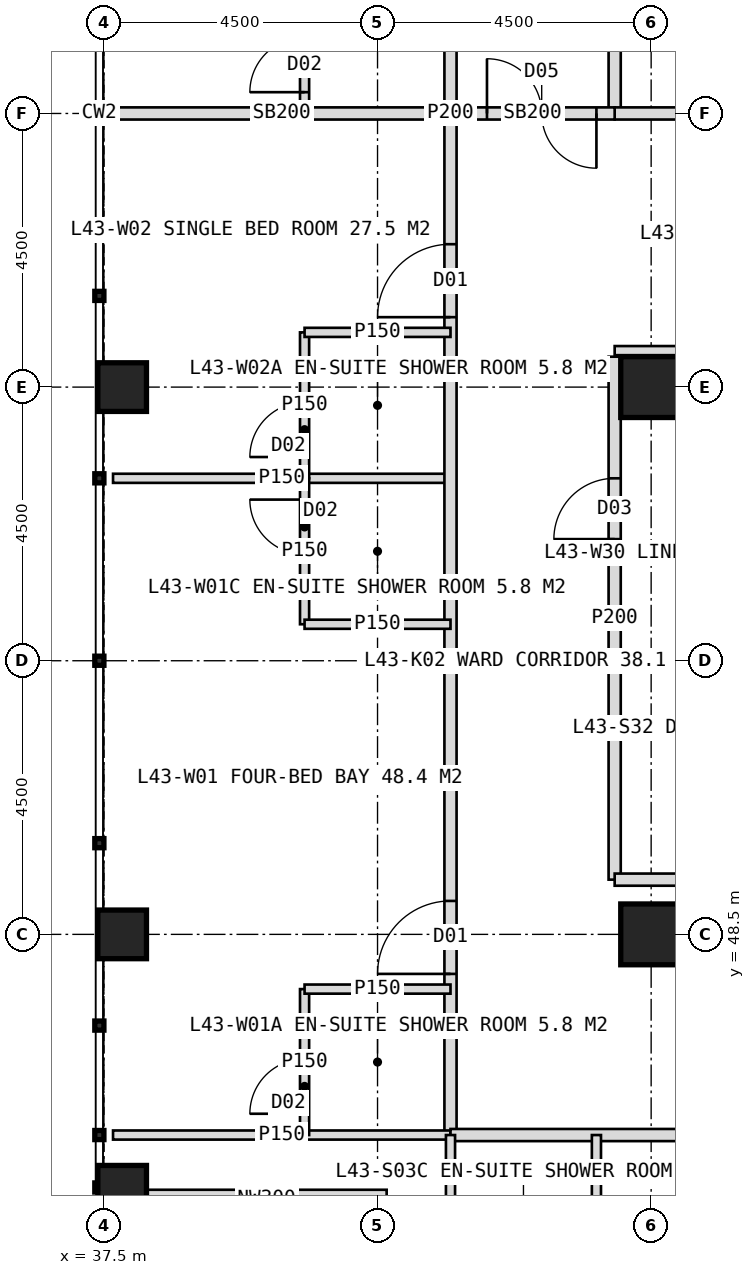
"""IFC4 building model, lengths in metres.
Left out: names, types, materials, properties, quantities, classifications, styles, units other than length and angle.
Written with IfcOpenShell. Run it as: python <this file> out.ifc"""

import sys

from ifc_helpers import new_model, si_unit, direction, frame, frame_2d, origin, origin_2d, place, context, subcontext, project, spatial, rectangle, hollow_rectangle, extrude, element, fill, save


model = new_model("IFC4")
c1 = context("Model", 3, precision=1e-05, world=origin(), true_north=direction((0.0, 1.0)))
c2 = subcontext(c1, "Body", "Model", "MODEL_VIEW")
j1 = project(units=[si_unit("LENGTHUNIT", "METRE"), si_unit("PLANEANGLEUNIT", "RADIAN")], contexts=[c1])
p1 = place(None, origin())
s1 = spatial("IfcSite", under=j1, at=p1, CompositionType="ELEMENT")
p2 = place(p1, origin())
s2 = spatial("IfcBuilding", under=s1, at=p2, CompositionType="ELEMENT")
p3 = place(p2, frame((0.0, 0.0, 181.0)))
s3 = spatial("IfcBuildingStorey", under=s2, at=p3, CompositionType="ELEMENT", Elevation=181.0)
for number, where, z_axis, x_axis in (
    (1, (46.5, 48.5, 0.0), (0.0, 0.0, 1.0), (1.0, 0.0, 0.0)),
    (2, (46.5, 57.5, 0.0), (0.0, 0.0, 1.0), (1.0, 0.0, 0.0)),
):
    element("IfcColumn", number, at=place(p3, frame(where, z_axis=z_axis, x_axis=x_axis)), inside=s3, PredefinedType="COLUMN", context=c2, shape_type="SweptSolid", body=[
        extrude(hollow_rectangle(XDim=1.0, YDim=1.0, WallThickness=0.1, at=origin_2d()), origin(), (0.0, 0.0, 1.0), 4.0),
    ])
for number, where, z_axis, x_axis in (
    (3, (37.8, 44.3, 0.0), (0.0, 0.0, 1.0), (1.0, 0.0, 0.0)),
    (4, (37.8, 48.5, 0.0), (0.0, 0.0, 1.0), (1.0, 0.0, 0.0)),
    (5, (37.8, 57.5, 0.0), (0.0, 0.0, 1.0), (1.0, 0.0, 0.0)),
):
    element("IfcColumn", number, at=place(p3, frame(where, z_axis=z_axis, x_axis=x_axis)), inside=s3, PredefinedType="COLUMN", context=c2, shape_type="SweptSolid", body=[
        extrude(hollow_rectangle(XDim=0.8, YDim=0.8, WallThickness=0.08, at=origin_2d()), origin(), (0.0, 0.0, 1.0), 4.0),
    ])
p4 = place(p3, frame((42.15, 44.15, 0.0), z_axis=(0.0, 0.0, 1.0), x_axis=(-1.0, 0.0, 0.0)))
e6 = element("IfcWall", 6, at=p4, inside=s3, PredefinedType="ELEMENTEDWALL", context=c2, shape_type="SweptSolid", body=[
    extrude(rectangle(XDim=3.95, YDim=0.3, at=frame_2d((1.975, 0.0))), origin(), (0.0, 0.0, 1.0), 2.85),
])
p5 = place(p3, frame((43.2, 56.0, 0.0), z_axis=(0.0, 0.0, 1.0), x_axis=(-1.0, 0.0, 0.0)))
e7 = element("IfcWall", 7, at=p5, inside=s3, PredefinedType="PARTITIONING", context=c2, shape_type="SweptSolid", body=[
    extrude(rectangle(XDim=5.55, YDim=0.15, at=frame_2d((2.775, 0.0))), origin(), (0.0, 0.0, 1.0), 3.75),
])
p6 = place(p3, frame((43.2, 62.0, 0.0), z_axis=(0.0, 0.0, 1.0), x_axis=(-1.0, 0.0, 0.0)))
e8 = element("IfcWall", 8, at=p6, inside=s3, PredefinedType="SOLIDWALL", context=c2, shape_type="SweptSolid", body=[
    extrude(rectangle(XDim=5.55, YDim=0.2, at=frame_2d((2.775, 0.0))), origin(), (0.0, 0.0, 1.0), 2.95),
])
p7 = place(p3, frame((43.2, 45.2, 0.0), z_axis=(0.0, 0.0, 1.0), x_axis=(0.0, 1.0, 0.0)))
e9 = element("IfcWall", 9, at=p7, inside=s3, PredefinedType="PARTITIONING", context=c2, shape_type="SweptSolid", body=[
    extrude(rectangle(XDim=33.6, YDim=0.2, at=frame_2d((16.8, 0.0))), origin(), (0.0, 0.0, 1.0), 3.75),
])
p8 = place(p7, frame((2.65, 0.0, 0.0)))
e10 = element("IfcOpeningElement", 10, at=p8, cuts=e9, PredefinedType="OPENING", context=c2, shape_type="SweptSolid", body=[
    extrude(rectangle(XDim=1.2, YDim=2.2, at=frame_2d((0.6, 1.1))), frame((0.0, 0.11, 0.0), z_axis=(0.0, -1.0, 0.0), x_axis=(1.0, 0.0, 0.0)), (0.0, 0.0, 1.0), 0.22),
])
p9 = place(p7, frame((13.45, 0.0, 0.0)))
e11 = element("IfcOpeningElement", 11, at=p9, cuts=e9, PredefinedType="OPENING", context=c2, shape_type="SweptSolid", body=[
    extrude(rectangle(XDim=1.2, YDim=2.2, at=frame_2d((0.6, 1.1))), frame((0.0, 0.11, 0.0), z_axis=(0.0, -1.0, 0.0), x_axis=(1.0, 0.0, 0.0)), (0.0, 0.0, 1.0), 0.22),
])
p10 = place(p7, frame((20.05, 0.0, 0.0)))
e12 = element("IfcOpeningElement", 12, at=p10, cuts=e9, PredefinedType="OPENING", context=c2, shape_type="SweptSolid", body=[
    extrude(rectangle(XDim=1.2, YDim=2.2, at=frame_2d((0.6, 1.1))), frame((0.0, 0.11, 0.0), z_axis=(0.0, -1.0, 0.0), x_axis=(1.0, 0.0, 0.0)), (0.0, 0.0, 1.0), 0.22),
])
p11 = place(p7, frame((29.05, 0.0, 0.0)))
e13 = element("IfcOpeningElement", 13, at=p11, cuts=e9, PredefinedType="OPENING", context=c2, shape_type="SweptSolid", body=[
    extrude(rectangle(XDim=1.2, YDim=2.2, at=frame_2d((0.6, 1.1))), frame((0.0, 0.11, 0.0), z_axis=(0.0, -1.0, 0.0), x_axis=(1.0, 0.0, 0.0)), (0.0, 0.0, 1.0), 0.22),
])
p12 = place(p3, frame((43.2, 45.2, 0.0), z_axis=(0.0, 0.0, 1.0), x_axis=(-1.0, 0.0, 0.0)))
e14 = element("IfcWall", 14, at=p12, inside=s3, PredefinedType="PARTITIONING", context=c2, shape_type="SweptSolid", body=[
    extrude(rectangle(XDim=5.55, YDim=0.15, at=frame_2d((2.775, 0.0))), origin(), (0.0, 0.0, 1.0), 3.75),
])
p13 = place(p3, frame((40.8, 45.2, 0.0), z_axis=(0.0, 0.0, 1.0), x_axis=(0.0, 1.0, 0.0)))
e15 = element("IfcWall", 15, at=p13, inside=s3, PredefinedType="PARTITIONING", context=c2, shape_type="SweptSolid", body=[
    extrude(rectangle(XDim=2.4, YDim=0.15, at=frame_2d((1.2, 0.0))), origin(), (0.0, 0.0, 1.0), 3.75),
])
p14 = place(p13, frame((0.35, 0.0, 0.0)))
e16 = element("IfcOpeningElement", 16, at=p14, cuts=e15, PredefinedType="OPENING", context=c2, shape_type="SweptSolid", body=[
    extrude(rectangle(XDim=0.9, YDim=2.1, at=frame_2d((0.45, 1.05))), frame((0.0, 0.085, 0.0), z_axis=(0.0, -1.0, 0.0), x_axis=(1.0, 0.0, 0.0)), (0.0, 0.0, 1.0), 0.17),
])
p15 = place(p3, frame((43.2, 47.6, 0.0), z_axis=(0.0, 0.0, 1.0), x_axis=(-1.0, 0.0, 0.0)))
e17 = element("IfcWall", 17, at=p15, inside=s3, PredefinedType="PARTITIONING", context=c2, shape_type="SweptSolid", body=[
    extrude(rectangle(XDim=2.4, YDim=0.15, at=frame_2d((1.2, 0.0))), origin(), (0.0, 0.0, 1.0), 3.75),
])
p16 = place(p3, frame((40.8, 53.6, 0.0), z_axis=(0.0, 0.0, 1.0), x_axis=(0.0, 1.0, 0.0)))
e18 = element("IfcWall", 18, at=p16, inside=s3, PredefinedType="PARTITIONING", context=c2, shape_type="SweptSolid", body=[
    extrude(rectangle(XDim=2.4, YDim=0.15, at=frame_2d((1.2, 0.0))), origin(), (0.0, 0.0, 1.0), 3.75),
])
p17 = place(p16, frame((1.15, 0.0, 0.0)))
e19 = element("IfcOpeningElement", 19, at=p17, cuts=e18, PredefinedType="OPENING", context=c2, shape_type="SweptSolid", body=[
    extrude(rectangle(XDim=0.9, YDim=2.1, at=frame_2d((0.45, 1.05))), frame((0.0, 0.085, 0.0), z_axis=(0.0, -1.0, 0.0), x_axis=(1.0, 0.0, 0.0)), (0.0, 0.0, 1.0), 0.17),
])
p18 = place(p3, frame((43.2, 53.6, 0.0), z_axis=(0.0, 0.0, 1.0), x_axis=(-1.0, 0.0, 0.0)))
e20 = element("IfcWall", 20, at=p18, inside=s3, PredefinedType="PARTITIONING", context=c2, shape_type="SweptSolid", body=[
    extrude(rectangle(XDim=2.4, YDim=0.15, at=frame_2d((1.2, 0.0))), origin(), (0.0, 0.0, 1.0), 3.75),
])
p19 = place(p3, frame((40.8, 56.0, 0.0), z_axis=(0.0, 0.0, 1.0), x_axis=(0.0, 1.0, 0.0)))
e21 = element("IfcWall", 21, at=p19, inside=s3, PredefinedType="PARTITIONING", context=c2, shape_type="SweptSolid", body=[
    extrude(rectangle(XDim=2.4, YDim=0.15, at=frame_2d((1.2, 0.0))), origin(), (0.0, 0.0, 1.0), 3.75),
])
p20 = place(p19, frame((0.35, 0.0, 0.0)))
e22 = element("IfcOpeningElement", 22, at=p20, cuts=e21, PredefinedType="OPENING", context=c2, shape_type="SweptSolid", body=[
    extrude(rectangle(XDim=0.9, YDim=2.1, at=frame_2d((0.45, 1.05))), frame((0.0, 0.085, 0.0), z_axis=(0.0, -1.0, 0.0), x_axis=(1.0, 0.0, 0.0)), (0.0, 0.0, 1.0), 0.17),
])
p21 = place(p3, frame((43.2, 58.4, 0.0), z_axis=(0.0, 0.0, 1.0), x_axis=(-1.0, 0.0, 0.0)))
e23 = element("IfcWall", 23, at=p21, inside=s3, PredefinedType="PARTITIONING", context=c2, shape_type="SweptSolid", body=[
    extrude(rectangle(XDim=2.4, YDim=0.15, at=frame_2d((1.2, 0.0))), origin(), (0.0, 0.0, 1.0), 3.75),
])
p22 = place(p3, frame((40.8, 62.0, 0.0), z_axis=(0.0, 0.0, 1.0), x_axis=(0.0, 1.0, 0.0)))
e24 = element("IfcWall", 24, at=p22, inside=s3, PredefinedType="PARTITIONING", context=c2, shape_type="SweptSolid", body=[
    extrude(rectangle(XDim=3.0, YDim=0.15, at=frame_2d((1.5, 0.0))), origin(), (0.0, 0.0, 1.0), 3.75),
])
p23 = place(p22, frame((0.35, 0.0, 0.0)))
e25 = element("IfcOpeningElement", 25, at=p23, cuts=e24, PredefinedType="OPENING", context=c2, shape_type="SweptSolid", body=[
    extrude(rectangle(XDim=0.9, YDim=2.1, at=frame_2d((0.45, 1.05))), frame((0.0, 0.085, 0.0), z_axis=(0.0, -1.0, 0.0), x_axis=(1.0, 0.0, 0.0)), (0.0, 0.0, 1.0), 0.17),
])
p24 = place(p3, frame((51.0, 53.0, 0.0), z_axis=(0.0, 0.0, 1.0), x_axis=(-1.0, 0.0, 0.0)))
e26 = element("IfcWall", 26, at=p24, inside=s3, PredefinedType="PARTITIONING", context=c2, shape_type="SweptSolid", body=[
    extrude(rectangle(XDim=5.1, YDim=0.15, at=frame_2d((2.55, 0.0))), origin(), (0.0, 0.0, 1.0), 3.75),
])
p25 = place(p3, frame((45.9, 49.4, 0.0), z_axis=(0.0, 0.0, 1.0), x_axis=(0.0, 1.0, 0.0)))
e27 = element("IfcWall", 27, at=p25, inside=s3, PredefinedType="PARTITIONING", context=c2, shape_type="SweptSolid", body=[
    extrude(rectangle(XDim=8.6, YDim=0.2, at=frame_2d((4.3, 0.0))), origin(), (0.0, 0.0, 1.0), 3.75),
])
p26 = place(p25, frame((5.6, 0.0, 0.0)))
e28 = element("IfcOpeningElement", 28, at=p26, cuts=e27, PredefinedType="OPENING", context=c2, shape_type="SweptSolid", body=[
    extrude(rectangle(XDim=1.0, YDim=2.1, at=frame_2d((0.5, 1.05))), frame((0.0, 0.11, 0.0), z_axis=(0.0, -1.0, 0.0), x_axis=(1.0, 0.0, 0.0)), (0.0, 0.0, 1.0), 0.22),
])
p27 = place(p3, frame((45.9, 62.0, 0.0), z_axis=(0.0, 0.0, 1.0), x_axis=(0.0, 1.0, 0.0)))
e29 = element("IfcWall", 29, at=p27, inside=s3, PredefinedType="PARTITIONING", context=c2, shape_type="SweptSolid", body=[
    extrude(rectangle(XDim=14.1, YDim=0.2, at=frame_2d((7.05, 0.0))), origin(), (0.0, 0.0, 1.0), 3.75),
])
p28 = place(p27, frame((1.45, 0.0, 0.0)))
e30 = element("IfcOpeningElement", 30, at=p28, cuts=e29, PredefinedType="OPENING", context=c2, shape_type="SweptSolid", body=[
    extrude(rectangle(XDim=1.0, YDim=2.1, at=frame_2d((0.5, 1.05))), frame((0.0, 0.11, 0.0), z_axis=(0.0, -1.0, 0.0), x_axis=(1.0, 0.0, 0.0)), (0.0, 0.0, 1.0), 0.22),
])
p29 = place(p27, frame((10.3, 0.0, 0.0)))
e31 = element("IfcOpeningElement", 31, at=p29, cuts=e29, PredefinedType="OPENING", context=c2, shape_type="SweptSolid", body=[
    extrude(rectangle(XDim=1.0, YDim=2.1, at=frame_2d((0.5, 1.05))), frame((0.0, 0.11, 0.0), z_axis=(0.0, -1.0, 0.0), x_axis=(1.0, 0.0, 0.0)), (0.0, 0.0, 1.0), 0.22),
])
p30 = place(p3, frame((51.0, 58.1, 0.0), z_axis=(0.0, 0.0, 1.0), x_axis=(-1.0, 0.0, 0.0)))
e32 = element("IfcWall", 32, at=p30, inside=s3, PredefinedType="PARTITIONING", context=c2, shape_type="SweptSolid", body=[
    extrude(rectangle(XDim=5.1, YDim=0.15, at=frame_2d((2.55, 0.0))), origin(), (0.0, 0.0, 1.0), 3.75),
])
p31 = place(p30, frame((0.6, 0.0, 0.0)))
e33 = element("IfcOpeningElement", 33, at=p31, cuts=e32, PredefinedType="OPENING", context=c2, shape_type="SweptSolid", body=[
    extrude(rectangle(XDim=0.9, YDim=2.1, at=frame_2d((0.45, 1.05))), frame((0.0, 0.085, 0.0), z_axis=(0.0, -1.0, 0.0), x_axis=(1.0, 0.0, 0.0)), (0.0, 0.0, 1.0), 0.17),
])
p32 = place(p3, frame((51.0, 62.0, 0.0), z_axis=(0.0, 0.0, 1.0), x_axis=(-1.0, 0.0, 0.0)))
e34 = element("IfcWall", 34, at=p32, inside=s3, PredefinedType="SOLIDWALL", context=c2, shape_type="SweptSolid", body=[
    extrude(rectangle(XDim=5.1, YDim=0.2, at=frame_2d((2.55, 0.0))), origin(), (0.0, 0.0, 1.0), 2.95),
])
p33 = place(p3, frame((76.8, 45.2, 0.0), z_axis=(0.0, 0.0, 1.0), x_axis=(-1.0, 0.0, 0.0)))
e35 = element("IfcWall", 35, at=p33, inside=s3, PredefinedType="PARTITIONING", context=c2, shape_type="SweptSolid", body=[
    extrude(rectangle(XDim=33.6, YDim=0.2, at=frame_2d((16.8, 0.0))), origin(), (0.0, 0.0, 1.0), 3.75),
])
p34 = place(p33, frame((2.65, 0.0, 0.0)))
e36 = element("IfcOpeningElement", 36, at=p34, cuts=e35, PredefinedType="OPENING", context=c2, shape_type="SweptSolid", body=[
    extrude(rectangle(XDim=1.2, YDim=2.2, at=frame_2d((0.6, 1.1))), frame((0.0, 0.11, 0.0), z_axis=(0.0, -1.0, 0.0), x_axis=(1.0, 0.0, 0.0)), (0.0, 0.0, 1.0), 0.22),
])
p35 = place(p33, frame((14.05, 0.0, 0.0)))
e37 = element("IfcOpeningElement", 37, at=p35, cuts=e35, PredefinedType="OPENING", context=c2, shape_type="SweptSolid", body=[
    extrude(rectangle(XDim=1.2, YDim=2.2, at=frame_2d((0.6, 1.1))), frame((0.0, 0.11, 0.0), z_axis=(0.0, -1.0, 0.0), x_axis=(1.0, 0.0, 0.0)), (0.0, 0.0, 1.0), 0.22),
])
p36 = place(p33, frame((22.45, 0.0, 0.0)))
e38 = element("IfcOpeningElement", 38, at=p36, cuts=e35, PredefinedType="OPENING", context=c2, shape_type="SweptSolid", body=[
    extrude(rectangle(XDim=1.2, YDim=2.2, at=frame_2d((0.6, 1.1))), frame((0.0, 0.11, 0.0), z_axis=(0.0, -1.0, 0.0), x_axis=(1.0, 0.0, 0.0)), (0.0, 0.0, 1.0), 0.22),
])
for number, where, z_axis, x_axis in (
    (39, (45.6, 45.2, 0.0), (0.0, 0.0, 1.0), (0.0, -1.0, 0.0)),
    (40, (43.2, 45.2, 0.0), (0.0, 0.0, 1.0), (0.0, -1.0, 0.0)),
):
    element("IfcWall", number, at=place(p3, frame(where, z_axis=z_axis, x_axis=x_axis)), inside=s3, PredefinedType="PARTITIONING", context=c2, shape_type="SweptSolid", body=[
        extrude(rectangle(XDim=2.4, YDim=0.15, at=frame_2d((1.2, 0.0))), origin(), (0.0, 0.0, 1.0), 3.75),
    ])
p37 = place(p3, frame((57.75, 49.4, 0.0), z_axis=(0.0, 0.0, 1.0), x_axis=(-1.0, 0.0, 0.0)))
e41 = element("IfcWall", 41, at=p37, inside=s3, PredefinedType="PARTITIONING", context=c2, shape_type="SweptSolid", body=[
    extrude(rectangle(XDim=11.85, YDim=0.2, at=frame_2d((5.925, 0.0))), origin(), (0.0, 0.0, 1.0), 3.75),
])
p38 = place(p37, frame((4.3, 0.0, 0.0)))
e42 = element("IfcOpeningElement", 42, at=p38, cuts=e41, PredefinedType="OPENING", context=c2, shape_type="SweptSolid", body=[
    extrude(rectangle(XDim=1.0, YDim=2.1, at=frame_2d((0.5, 1.05))), frame((0.0, 0.11, 0.0), z_axis=(0.0, -1.0, 0.0), x_axis=(1.0, 0.0, 0.0)), (0.0, 0.0, 1.0), 0.22),
])
p39 = place(p37, frame((8.8, 0.0, 0.0)))
e43 = element("IfcOpeningElement", 43, at=p39, cuts=e41, PredefinedType="OPENING", context=c2, shape_type="SweptSolid", body=[
    extrude(rectangle(XDim=1.0, YDim=2.1, at=frame_2d((0.5, 1.05))), frame((0.0, 0.11, 0.0), z_axis=(0.0, -1.0, 0.0), x_axis=(1.0, 0.0, 0.0)), (0.0, 0.0, 1.0), 0.22),
])
p40 = place(p3, frame((45.9, 62.0, 0.0), z_axis=(0.0, 0.0, 1.0), x_axis=(-1.0, 0.0, 0.0)))
e44 = element("IfcWall", 44, at=p40, inside=s3, PredefinedType="SOLIDWALL", context=c2, shape_type="SweptSolid", body=[
    extrude(rectangle(XDim=2.7, YDim=0.2, at=frame_2d((1.35, 0.0))), origin(), (0.0, 0.0, 1.0), 2.95),
])
p41 = place(p40, frame((0.3, 0.0, 0.0)))
e45 = element("IfcOpeningElement", 45, at=p41, cuts=e44, PredefinedType="OPENING", context=c2, shape_type="SweptSolid", body=[
    extrude(rectangle(XDim=1.8, YDim=2.2, at=frame_2d((0.9, 1.1))), frame((0.0, 0.11, 0.0), z_axis=(0.0, -1.0, 0.0), x_axis=(1.0, 0.0, 0.0)), (0.0, 0.0, 1.0), 0.22),
])
p42 = place(p8, origin())
e46 = element("IfcDoor", 46, at=p42, inside=s3, OperationType="SINGLE_SWING_LEFT", PredefinedType="DOOR", context=c2, shape_type="SweptSolid", body=[
    extrude(rectangle(XDim=1.2, YDim=2.2, at=frame_2d((0.6, 1.1))), frame((0.0, 0.025, 0.0), z_axis=(0.0, -1.0, 0.0), x_axis=(1.0, 0.0, 0.0)), (0.0, 0.0, 1.0), 0.05),
])
fill(e10, e46)
p43 = place(p14, origin())
e47 = element("IfcDoor", 47, at=p43, inside=s3, OperationType="SINGLE_SWING_LEFT", PredefinedType="DOOR", context=c2, shape_type="SweptSolid", body=[
    extrude(rectangle(XDim=0.9, YDim=2.1, at=frame_2d((0.45, 1.05))), frame((0.0, 0.025, 0.0), z_axis=(0.0, -1.0, 0.0), x_axis=(1.0, 0.0, 0.0)), (0.0, 0.0, 1.0), 0.05),
])
fill(e16, e47)
p44 = place(p17, origin())
e48 = element("IfcDoor", 48, at=p44, inside=s3, OperationType="SINGLE_SWING_RIGHT", PredefinedType="DOOR", context=c2, shape_type="SweptSolid", body=[
    extrude(rectangle(XDim=0.9, YDim=2.1, at=frame_2d((0.45, 1.05))), frame((0.0, 0.025, 0.0), z_axis=(0.0, -1.0, 0.0), x_axis=(1.0, 0.0, 0.0)), (0.0, 0.0, 1.0), 0.05),
])
fill(e19, e48)
p45 = place(p9, origin())
e49 = element("IfcDoor", 49, at=p45, inside=s3, OperationType="SINGLE_SWING_LEFT", PredefinedType="DOOR", context=c2, shape_type="SweptSolid", body=[
    extrude(rectangle(XDim=1.2, YDim=2.2, at=frame_2d((0.6, 1.1))), frame((0.0, 0.025, 0.0), z_axis=(0.0, -1.0, 0.0), x_axis=(1.0, 0.0, 0.0)), (0.0, 0.0, 1.0), 0.05),
])
fill(e11, e49)
p46 = place(p20, origin())
e50 = element("IfcDoor", 50, at=p46, inside=s3, OperationType="SINGLE_SWING_LEFT", PredefinedType="DOOR", context=c2, shape_type="SweptSolid", body=[
    extrude(rectangle(XDim=0.9, YDim=2.1, at=frame_2d((0.45, 1.05))), frame((0.0, 0.025, 0.0), z_axis=(0.0, -1.0, 0.0), x_axis=(1.0, 0.0, 0.0)), (0.0, 0.0, 1.0), 0.05),
])
fill(e22, e50)
p47 = place(p23, origin())
e51 = element("IfcDoor", 51, at=p47, inside=s3, OperationType="SINGLE_SWING_LEFT", PredefinedType="DOOR", context=c2, shape_type="SweptSolid", body=[
    extrude(rectangle(XDim=0.9, YDim=2.1, at=frame_2d((0.45, 1.05))), frame((0.0, 0.025, 0.0), z_axis=(0.0, -1.0, 0.0), x_axis=(1.0, 0.0, 0.0)), (0.0, 0.0, 1.0), 0.05),
])
fill(e25, e51)
p48 = place(p26, origin())
e52 = element("IfcDoor", 52, at=p48, inside=s3, OperationType="SINGLE_SWING_LEFT", PredefinedType="DOOR", context=c2, shape_type="SweptSolid", body=[
    extrude(rectangle(XDim=1.0, YDim=2.1, at=frame_2d((0.5, 1.05))), frame((0.0, 0.025, 0.0), z_axis=(0.0, -1.0, 0.0), x_axis=(1.0, 0.0, 0.0)), (0.0, 0.0, 1.0), 0.05),
])
fill(e28, e52)
p49 = place(p41, origin())
e53 = element("IfcDoor", 53, at=p49, inside=s3, OperationType="DOUBLE_DOOR_DOUBLE_SWING", PredefinedType="DOOR", context=c2, shape_type="SweptSolid", body=[
    extrude(rectangle(XDim=1.8, YDim=2.2, at=frame_2d((0.9, 1.1))), frame((0.0, 0.025, 0.0), z_axis=(0.0, -1.0, 0.0), x_axis=(1.0, 0.0, 0.0)), (0.0, 0.0, 1.0), 0.05),
])
fill(e45, e53)
save(model, sys.argv[1])
